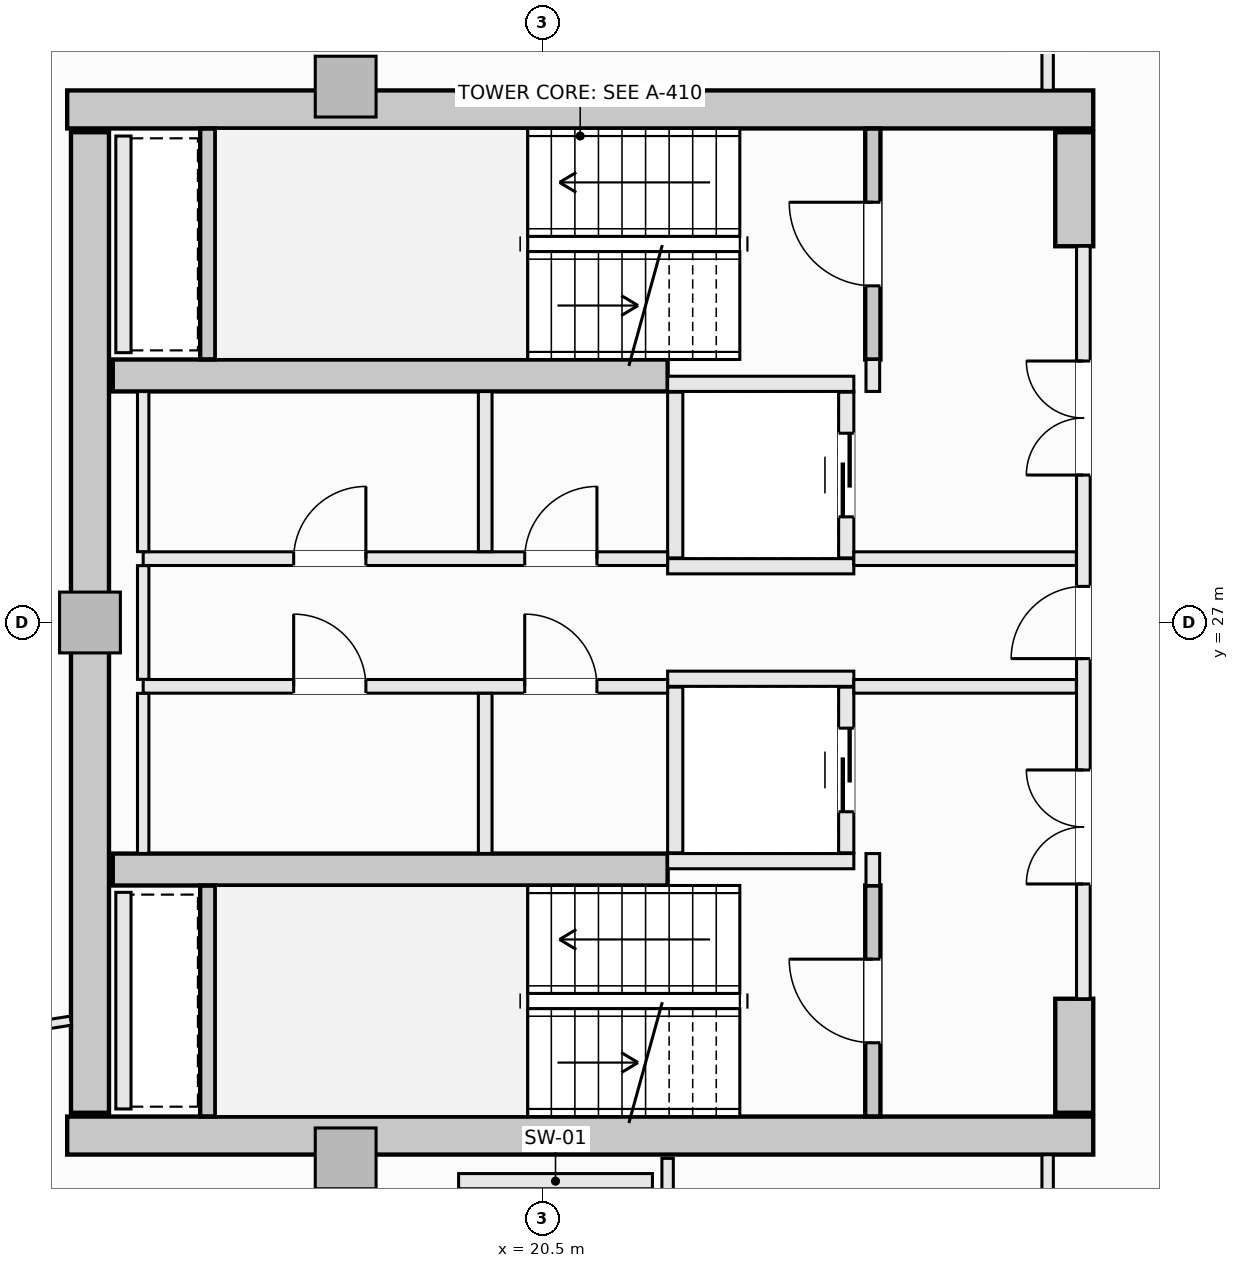
"""IFC4 building model, lengths in metres.
Left out: names, types, materials, properties, quantities, classifications, styles, units other than length and angle.
Written with IfcOpenShell. Run it as: python <this file> out.ifc"""

import sys

from ifc_helpers import new_model, si_unit, direction, frame, frame_2d, origin, origin_2d, place, context, subcontext, project, spatial, rectangle, extrude, element, fill, save


model = new_model("IFC4")
c1 = context("Model", 3, precision=1e-05, world=origin(), true_north=direction((0.0, 1.0)))
c2 = subcontext(c1, "Body", "Model", "MODEL_VIEW")
j1 = project(units=[si_unit("LENGTHUNIT", "METRE"), si_unit("PLANEANGLEUNIT", "RADIAN")], contexts=[c1])
p1 = place(None, origin())
s1 = spatial("IfcSite", under=j1, at=p1, CompositionType="ELEMENT")
p2 = place(p1, origin())
s2 = spatial("IfcBuilding", under=s1, at=p2, CompositionType="ELEMENT")
p3 = place(p2, frame((0.0, 0.0, 219.5)))
s3 = spatial("IfcBuildingStorey", under=s2, at=p3, CompositionType="ELEMENT", Elevation=219.5)
for number, where, z_axis, x_axis in (
    (1, (14.25, 33.75, -0.27), (0.0, 0.0, 1.0), (1.0, 0.0, 0.0)),
    (2, (14.25, 20.25, -0.27), (0.0, 0.0, 1.0), (1.0, 0.0, 0.0)),
):
    element("IfcWall", number, at=place(p3, frame(where, z_axis=z_axis, x_axis=x_axis)), inside=s3, PredefinedType="SHEAR", context=c2, shape_type="SweptSolid", body=[
        extrude(rectangle(XDim=13.5, YDim=0.5, at=frame_2d((6.75, 0.0))), origin(), (0.0, 0.0, 1.0), 3.3),
    ])
p4 = place(p3, frame((14.55, 20.55, -0.27), z_axis=(0.0, 0.0, 1.0), x_axis=(0.0, 1.0, 0.0)))
e3 = element("IfcWall", 3, at=p4, inside=s3, PredefinedType="SHEAR", context=c2, shape_type="SweptSolid", body=[
    extrude(rectangle(XDim=12.9, YDim=0.5, at=frame_2d((6.45, 0.0))), origin(), (0.0, 0.0, 1.0), 3.3),
])
for number, where, z_axis, x_axis in (
    (4, (27.5, 31.95, -0.27), (0.0, 0.0, 1.0), (0.0, 1.0, 0.0)),
    (5, (27.5, 20.55, -0.27), (0.0, 0.0, 1.0), (0.0, 1.0, 0.0)),
):
    element("IfcWall", number, at=place(p3, frame(where, z_axis=z_axis, x_axis=x_axis)), inside=s3, PredefinedType="SHEAR", context=c2, shape_type="SweptSolid", body=[
        extrude(rectangle(XDim=1.5, YDim=0.5, at=frame_2d((0.75, 0.0))), origin(), (0.0, 0.0, 1.0), 3.3),
    ])
for number, where, z_axis, x_axis in (
    (6, (14.85, 30.25, -0.27), (0.0, 0.0, 1.0), (1.0, 0.0, 0.0)),
    (7, (14.85, 23.75, -0.27), (0.0, 0.0, 1.0), (1.0, 0.0, 0.0)),
):
    element("IfcWall", number, at=place(p3, frame(where, z_axis=z_axis, x_axis=x_axis)), inside=s3, PredefinedType="SHEAR", context=c2, shape_type="SweptSolid", body=[
        extrude(rectangle(XDim=7.3, YDim=0.42, at=frame_2d((3.65, 0.0))), origin(), (0.0, 0.0, 1.0), 3.3),
    ])
for number, where, z_axis, x_axis in (
    (8, (17.914, 34.05, -0.27), (0.0, 0.0, 1.0), (1.0, 0.0, 0.0)),
    (9, (14.55, 27.0, -0.27), (0.0, 0.0, 1.0), (1.0, 0.0, 0.0)),
    (10, (17.914, 19.95, -0.27), (0.0, 0.0, 1.0), (1.0, 0.0, 0.0)),
):
    element("IfcColumn", number, at=place(p3, frame(where, z_axis=z_axis, x_axis=x_axis)), inside=s3, PredefinedType="PILASTER", context=c2, shape_type="SweptSolid", body=[
        extrude(rectangle(XDim=0.8, YDim=0.8, at=origin_2d()), origin(), (0.0, 0.0, 1.0), 3.3),
    ])
p5 = place(p3, frame((24.85, 30.46, -0.27), z_axis=(0.0, 0.0, 1.0), x_axis=(0.0, 1.0, 0.0)))
e11 = element("IfcWall", 11, at=p5, inside=s3, PredefinedType="SHEAR", context=c2, shape_type="SweptSolid", body=[
    extrude(rectangle(XDim=3.038, YDim=0.2, at=frame_2d((1.519, 0.0))), origin(), (0.0, 0.0, 1.0), 3.3),
])
p6 = place(p5, frame((0.969, 0.0, 0.27)))
e12 = element("IfcOpeningElement", 12, at=p6, cuts=e11, PredefinedType="OPENING", context=c2, shape_type="SweptSolid", body=[
    extrude(rectangle(XDim=1.1, YDim=2.15, at=frame_2d((0.55, 1.075))), frame((0.0, 0.11, 0.0), z_axis=(0.0, -1.0, 0.0), x_axis=(1.0, 0.0, 0.0)), (0.0, 0.0, 1.0), 0.22),
])
p7 = place(p3, frame((16.1, 30.462, -0.27), z_axis=(0.0, 0.0, 1.0), x_axis=(0.0, 1.0, 0.0)))
e13 = element("IfcWall", 13, at=p7, inside=s3, PredefinedType="SHEAR", context=c2, shape_type="SweptSolid", body=[
    extrude(rectangle(XDim=3.036, YDim=0.2, at=frame_2d((1.518, 0.0))), origin(), (0.0, 0.0, 1.0), 3.3),
])
p8 = place(p3, frame((24.85, 20.502, -0.27), z_axis=(0.0, 0.0, 1.0), x_axis=(0.0, 1.0, 0.0)))
e14 = element("IfcWall", 14, at=p8, inside=s3, PredefinedType="SHEAR", context=c2, shape_type="SweptSolid", body=[
    extrude(rectangle(XDim=3.038, YDim=0.2, at=frame_2d((1.519, 0.0))), origin(), (0.0, 0.0, 1.0), 3.3),
])
p9 = place(p8, frame((0.969, 0.0, 0.27)))
e15 = element("IfcOpeningElement", 15, at=p9, cuts=e14, PredefinedType="OPENING", context=c2, shape_type="SweptSolid", body=[
    extrude(rectangle(XDim=1.1, YDim=2.15, at=frame_2d((0.55, 1.075))), frame((0.0, 0.11, 0.0), z_axis=(0.0, -1.0, 0.0), x_axis=(1.0, 0.0, 0.0)), (0.0, 0.0, 1.0), 0.22),
])
p10 = place(p3, frame((16.1, 20.502, -0.27), z_axis=(0.0, 0.0, 1.0), x_axis=(0.0, 1.0, 0.0)))
e16 = element("IfcWall", 16, at=p10, inside=s3, PredefinedType="SHEAR", context=c2, shape_type="SweptSolid", body=[
    extrude(rectangle(XDim=3.036, YDim=0.2, at=frame_2d((1.518, 0.0))), origin(), (0.0, 0.0, 1.0), 3.3),
])
for number, where, z_axis, x_axis in (
    (17, (22.15, 30.14, 0.0), (0.0, 0.0, 1.0), (1.0, 0.0, 0.0)),
    (18, (22.15, 27.74, 0.0), (0.0, 0.0, 1.0), (1.0, 0.0, 0.0)),
):
    element("IfcWall", number, at=place(p3, frame(where, z_axis=z_axis, x_axis=x_axis)), inside=s3, PredefinedType="SOLIDWALL", context=c2, shape_type="SweptSolid", body=[
        extrude(rectangle(XDim=2.45, YDim=0.2, at=frame_2d((1.225, 0.0))), origin(), (0.0, 0.0, 1.0), 3.03),
    ])
p11 = place(p3, frame((22.25, 27.85, 0.0), z_axis=(0.0, 0.0, 1.0), x_axis=(0.0, 1.0, 0.0)))
e19 = element("IfcWall", 19, at=p11, inside=s3, PredefinedType="SOLIDWALL", context=c2, shape_type="SweptSolid", body=[
    extrude(rectangle(XDim=2.18, YDim=0.2, at=frame_2d((1.09, 0.0))), origin(), (0.0, 0.0, 1.0), 3.03),
])
p12 = place(p3, frame((24.5, 27.85, 0.0), z_axis=(0.0, 0.0, 1.0), x_axis=(0.0, 1.0, 0.0)))
e20 = element("IfcWall", 20, at=p12, inside=s3, PredefinedType="SOLIDWALL", context=c2, shape_type="SweptSolid", body=[
    extrude(rectangle(XDim=2.18, YDim=0.2, at=frame_2d((1.09, 0.0))), origin(), (0.0, 0.0, 1.0), 3.03),
])
p13 = place(p12, frame((0.54, 0.0, 0.0)))
e21 = element("IfcOpeningElement", 21, at=p13, cuts=e20, PredefinedType="OPENING", context=c2, shape_type="SweptSolid", body=[
    extrude(rectangle(XDim=1.1, YDim=2.2, at=frame_2d((0.55, 1.1))), frame((0.0, 0.11, 0.0), z_axis=(0.0, -1.0, 0.0), x_axis=(1.0, 0.0, 0.0)), (0.0, 0.0, 1.0), 0.22),
])
for number, where, z_axis, x_axis in (
    (22, (22.15, 26.26, 0.0), (0.0, 0.0, 1.0), (1.0, 0.0, 0.0)),
    (23, (22.15, 23.86, 0.0), (0.0, 0.0, 1.0), (1.0, 0.0, 0.0)),
):
    element("IfcWall", number, at=place(p3, frame(where, z_axis=z_axis, x_axis=x_axis)), inside=s3, PredefinedType="SOLIDWALL", context=c2, shape_type="SweptSolid", body=[
        extrude(rectangle(XDim=2.45, YDim=0.2, at=frame_2d((1.225, 0.0))), origin(), (0.0, 0.0, 1.0), 3.03),
    ])
p14 = place(p3, frame((22.25, 23.97, 0.0), z_axis=(0.0, 0.0, 1.0), x_axis=(0.0, 1.0, 0.0)))
e24 = element("IfcWall", 24, at=p14, inside=s3, PredefinedType="SOLIDWALL", context=c2, shape_type="SweptSolid", body=[
    extrude(rectangle(XDim=2.18, YDim=0.2, at=frame_2d((1.09, 0.0))), origin(), (0.0, 0.0, 1.0), 3.03),
])
p15 = place(p3, frame((24.5, 23.97, 0.0), z_axis=(0.0, 0.0, 1.0), x_axis=(0.0, 1.0, 0.0)))
e25 = element("IfcWall", 25, at=p15, inside=s3, PredefinedType="SOLIDWALL", context=c2, shape_type="SweptSolid", body=[
    extrude(rectangle(XDim=2.18, YDim=0.2, at=frame_2d((1.09, 0.0))), origin(), (0.0, 0.0, 1.0), 3.03),
])
p16 = place(p15, frame((0.54, 0.0, 0.0)))
e26 = element("IfcOpeningElement", 26, at=p16, cuts=e25, PredefinedType="OPENING", context=c2, shape_type="SweptSolid", body=[
    extrude(rectangle(XDim=1.1, YDim=2.2, at=frame_2d((0.55, 1.1))), frame((0.0, 0.11, 0.0), z_axis=(0.0, -1.0, 0.0), x_axis=(1.0, 0.0, 0.0)), (0.0, 0.0, 1.0), 0.22),
])
p17 = place(p3, frame((19.4, 19.65, 0.0), z_axis=(0.0, 0.0, 1.0), x_axis=(1.0, 0.0, 0.0)))
e27 = element("IfcWall", 27, at=p17, inside=s3, PredefinedType="SOLIDWALL", context=c2, shape_type="SweptSolid", body=[
    extrude(rectangle(XDim=2.55, YDim=0.2, at=frame_2d((1.275, 0.0))), origin(), (0.0, 0.0, 1.0), 3.03),
])
for number, where, z_axis, x_axis in (
    (28, (14.99, 30.55, 0.0), (0.0, 0.0, 1.0), (0.0, 1.0, 0.0)),
    (29, (14.99, 20.6, 0.0), (0.0, 0.0, 1.0), (0.0, 1.0, 0.0)),
):
    element("IfcWall", number, at=place(p3, frame(where, z_axis=z_axis, x_axis=x_axis)), inside=s3, PredefinedType="SOLIDWALL", context=c2, shape_type="SweptSolid", body=[
        extrude(rectangle(XDim=2.85, YDim=0.2, at=frame_2d((1.425, 0.0))), origin(), (0.0, 0.0, 1.0), 3.03),
    ])
for number, where, z_axis, x_axis in (
    (30, (24.85, 23.54, 0.0), (0.0, 0.0, 1.0), (0.0, 1.0, 0.0)),
    (31, (24.85, 30.04, 0.0), (0.0, 0.0, 1.0), (0.0, 1.0, 0.0)),
):
    element("IfcWall", number, at=place(p3, frame(where, z_axis=z_axis, x_axis=x_axis)), inside=s3, PredefinedType="SOLIDWALL", context=c2, shape_type="SweptSolid", body=[
        extrude(rectangle(XDim=0.42, YDim=0.18, at=frame_2d((0.21, 0.0))), origin(), (0.0, 0.0, 1.0), 3.03),
    ])
p18 = place(p3, frame((27.62, 22.05, 0.0), z_axis=(0.0, 0.0, 1.0), x_axis=(0.0, 1.0, 0.0)))
e32 = element("IfcWall", 32, at=p18, inside=s3, PredefinedType="SOLIDWALL", context=c2, shape_type="SweptSolid", body=[
    extrude(rectangle(XDim=9.9, YDim=0.18, at=frame_2d((4.95, 0.0))), origin(), (0.0, 0.0, 1.0), 3.03),
])
p19 = place(p18, frame((4.475, 0.0, 0.0)))
e33 = element("IfcOpeningElement", 33, at=p19, cuts=e32, PredefinedType="OPENING", context=c2, shape_type="SweptSolid", body=[
    extrude(rectangle(XDim=0.95, YDim=2.1, at=frame_2d((0.475, 1.05))), frame((0.0, 0.1, 0.0), z_axis=(0.0, -1.0, 0.0), x_axis=(1.0, 0.0, 0.0)), (0.0, 0.0, 1.0), 0.2),
])
p20 = place(p18, frame((6.89, 0.0, 0.0)))
e34 = element("IfcOpeningElement", 34, at=p20, cuts=e32, PredefinedType="OPENING", context=c2, shape_type="SweptSolid", body=[
    extrude(rectangle(XDim=1.5, YDim=2.2, at=frame_2d((0.75, 1.1))), frame((0.0, 0.1, 0.0), z_axis=(0.0, -1.0, 0.0), x_axis=(1.0, 0.0, 0.0)), (0.0, 0.0, 1.0), 0.2),
])
p21 = place(p18, frame((1.51, 0.0, 0.0)))
e35 = element("IfcOpeningElement", 35, at=p21, cuts=e32, PredefinedType="OPENING", context=c2, shape_type="SweptSolid", body=[
    extrude(rectangle(XDim=1.5, YDim=2.2, at=frame_2d((0.75, 1.1))), frame((0.0, 0.1, 0.0), z_axis=(0.0, -1.0, 0.0), x_axis=(1.0, 0.0, 0.0)), (0.0, 0.0, 1.0), 0.2),
])
p22 = place(p3, frame((15.25, 27.84, 0.0), z_axis=(0.0, 0.0, 1.0), x_axis=(1.0, 0.0, 0.0)))
e36 = element("IfcWall", 36, at=p22, inside=s3, PredefinedType="SOLIDWALL", context=c2, shape_type="SweptSolid", body=[
    extrude(rectangle(XDim=6.9, YDim=0.18, at=frame_2d((3.45, 0.0))), origin(), (0.0, 0.0, 1.0), 3.03),
])
p23 = place(p22, frame((5.02, 0.0, 0.0)))
e37 = element("IfcOpeningElement", 37, at=p23, cuts=e36, PredefinedType="OPENING", context=c2, shape_type="SweptSolid", body=[
    extrude(rectangle(XDim=0.95, YDim=2.1, at=frame_2d((0.475, 1.05))), frame((0.0, 0.1, 0.0), z_axis=(0.0, -1.0, 0.0), x_axis=(1.0, 0.0, 0.0)), (0.0, 0.0, 1.0), 0.2),
])
p24 = place(p22, frame((1.98, 0.0, 0.0)))
e38 = element("IfcOpeningElement", 38, at=p24, cuts=e36, PredefinedType="OPENING", context=c2, shape_type="SweptSolid", body=[
    extrude(rectangle(XDim=0.95, YDim=2.1, at=frame_2d((0.475, 1.05))), frame((0.0, 0.1, 0.0), z_axis=(0.0, -1.0, 0.0), x_axis=(1.0, 0.0, 0.0)), (0.0, 0.0, 1.0), 0.2),
])
p25 = place(p3, frame((24.6, 27.84, 0.0), z_axis=(0.0, 0.0, 1.0), x_axis=(1.0, 0.0, 0.0)))
e39 = element("IfcWall", 39, at=p25, inside=s3, PredefinedType="SOLIDWALL", context=c2, shape_type="SweptSolid", body=[
    extrude(rectangle(XDim=2.928, YDim=0.18, at=frame_2d((1.464, 0.0))), origin(), (0.0, 0.0, 1.0), 3.03),
])
p26 = place(p3, frame((15.25, 26.16, 0.0), z_axis=(0.0, 0.0, 1.0), x_axis=(1.0, 0.0, 0.0)))
e40 = element("IfcWall", 40, at=p26, inside=s3, PredefinedType="SOLIDWALL", context=c2, shape_type="SweptSolid", body=[
    extrude(rectangle(XDim=6.9, YDim=0.18, at=frame_2d((3.45, 0.0))), origin(), (0.0, 0.0, 1.0), 3.03),
])
p27 = place(p26, frame((5.02, 0.0, 0.0)))
e41 = element("IfcOpeningElement", 41, at=p27, cuts=e40, PredefinedType="OPENING", context=c2, shape_type="SweptSolid", body=[
    extrude(rectangle(XDim=0.95, YDim=2.1, at=frame_2d((0.475, 1.05))), frame((0.0, 0.1, 0.0), z_axis=(0.0, -1.0, 0.0), x_axis=(1.0, 0.0, 0.0)), (0.0, 0.0, 1.0), 0.2),
])
p28 = place(p26, frame((1.98, 0.0, 0.0)))
e42 = element("IfcOpeningElement", 42, at=p28, cuts=e40, PredefinedType="OPENING", context=c2, shape_type="SweptSolid", body=[
    extrude(rectangle(XDim=0.95, YDim=2.1, at=frame_2d((0.475, 1.05))), frame((0.0, 0.1, 0.0), z_axis=(0.0, -1.0, 0.0), x_axis=(1.0, 0.0, 0.0)), (0.0, 0.0, 1.0), 0.2),
])
p29 = place(p3, frame((24.6, 26.16, 0.0), z_axis=(0.0, 0.0, 1.0), x_axis=(1.0, 0.0, 0.0)))
e43 = element("IfcWall", 43, at=p29, inside=s3, PredefinedType="SOLIDWALL", context=c2, shape_type="SweptSolid", body=[
    extrude(rectangle(XDim=2.928, YDim=0.18, at=frame_2d((1.464, 0.0))), origin(), (0.0, 0.0, 1.0), 3.03),
])
p30 = place(p3, frame((15.25, 23.962, 0.0), z_axis=(0.0, 0.0, 1.0), x_axis=(0.0, 1.0, 0.0)))
e44 = element("IfcWall", 44, at=p30, inside=s3, PredefinedType="PARTITIONING", context=c2, shape_type="SweptSolid", body=[
    extrude(rectangle(XDim=2.106, YDim=0.15, at=frame_2d((1.053, 0.0))), origin(), (0.0, 0.0, 1.0), 3.03),
])
p31 = place(p3, frame((15.25, 26.252, 0.0), z_axis=(0.0, 0.0, 1.0), x_axis=(0.0, 1.0, 0.0)))
e45 = element("IfcWall", 45, at=p31, inside=s3, PredefinedType="PARTITIONING", context=c2, shape_type="SweptSolid", body=[
    extrude(rectangle(XDim=1.496, YDim=0.15, at=frame_2d((0.748, 0.0))), origin(), (0.0, 0.0, 1.0), 3.03),
])
p32 = place(p3, frame((15.25, 27.932, 0.0), z_axis=(0.0, 0.0, 1.0), x_axis=(0.0, 1.0, 0.0)))
e46 = element("IfcWall", 46, at=p32, inside=s3, PredefinedType="PARTITIONING", context=c2, shape_type="SweptSolid", body=[
    extrude(rectangle(XDim=2.106, YDim=0.15, at=frame_2d((1.053, 0.0))), origin(), (0.0, 0.0, 1.0), 3.03),
])
for number, where, z_axis, x_axis in (
    (47, (19.75, 23.962, 0.0), (0.0, 0.0, 1.0), (0.0, 1.0, 0.0)),
    (48, (19.75, 27.932, 0.0), (0.0, 0.0, 1.0), (0.0, 1.0, 0.0)),
):
    element("IfcWall", number, at=place(p3, frame(where, z_axis=z_axis, x_axis=x_axis)), inside=s3, PredefinedType="SOLIDWALL", context=c2, shape_type="SweptSolid", body=[
        extrude(rectangle(XDim=2.106, YDim=0.18, at=frame_2d((1.053, 0.0))), origin(), (0.0, 0.0, 1.0), 3.03),
    ])
p33 = place(p3, frame((22.15, 17.127, 0.0), z_axis=(0.0, 0.0, 1.0), x_axis=(0.0, 1.0, 0.0)))
e49 = element("IfcWall", 49, at=p33, inside=s3, PredefinedType="PARTITIONING", context=c2, shape_type="SweptSolid", body=[
    extrude(rectangle(XDim=2.823, YDim=0.15, at=frame_2d((1.412, 0.0))), origin(), (0.0, 0.0, 1.0), 3.03),
])
p34 = place(p3, frame((27.15, 17.127, 0.0), z_axis=(0.0, 0.0, 1.0), x_axis=(0.0, 1.0, 0.0)))
e50 = element("IfcWall", 50, at=p34, inside=s3, PredefinedType="PARTITIONING", context=c2, shape_type="SweptSolid", body=[
    extrude(rectangle(XDim=2.871, YDim=0.15, at=frame_2d((1.436, 0.0))), origin(), (0.0, 0.0, 1.0), 3.03),
])
p35 = place(p34, frame((0.96, 0.0, 0.0)))
e51 = element("IfcOpeningElement", 51, at=p35, cuts=e50, PredefinedType="OPENING", context=c2, shape_type="SweptSolid", body=[
    extrude(rectangle(XDim=0.95, YDim=2.1, at=frame_2d((0.475, 1.05))), frame((0.0, 0.085, 0.0), z_axis=(0.0, -1.0, 0.0), x_axis=(1.0, 0.0, 0.0)), (0.0, 0.0, 1.0), 0.17),
])
p36 = place(p3, frame((27.15, 34.002, 0.0), z_axis=(0.0, 0.0, 1.0), x_axis=(0.0, 1.0, 0.0)))
e52 = element("IfcWall", 52, at=p36, inside=s3, PredefinedType="PARTITIONING", context=c2, shape_type="SweptSolid", body=[
    extrude(rectangle(XDim=4.198, YDim=0.15, at=frame_2d((2.099, 0.0))), origin(), (0.0, 0.0, 1.0), 3.03),
])
p37 = place(p36, frame((1.998, 0.0, 0.0)))
e53 = element("IfcOpeningElement", 53, at=p37, cuts=e52, PredefinedType="OPENING", context=c2, shape_type="SweptSolid", body=[
    extrude(rectangle(XDim=0.95, YDim=2.1, at=frame_2d((0.475, 1.05))), frame((0.0, 0.085, 0.0), z_axis=(0.0, -1.0, 0.0), x_axis=(1.0, 0.0, 0.0)), (0.0, 0.0, 1.0), 0.17),
])
p38 = place(p3, frame((7.041, 20.617, 0.0), z_axis=(0.0, 0.0, 1.0), x_axis=(0.987780472541, 0.155851654036, 0.0)))
e54 = element("IfcWall", 54, at=p38, inside=s3, PredefinedType="PARTITIONING", context=c2, shape_type="SweptSolid", body=[
    extrude(rectangle(XDim=7.347, YDim=0.12, at=frame_2d((3.673, 0.0))), origin(), (0.0, 0.0, 1.0), 3.03),
])
p39 = place(p6, origin())
e55 = element("IfcDoor", 55, at=p39, inside=s3, OperationType="SINGLE_SWING_RIGHT", PredefinedType="DOOR", context=c2, shape_type="SweptSolid", body=[
    extrude(rectangle(XDim=1.1, YDim=2.15, at=frame_2d((0.55, 1.075))), frame((0.0, 0.025, 0.0), z_axis=(0.0, -1.0, 0.0), x_axis=(1.0, 0.0, 0.0)), (0.0, 0.0, 1.0), 0.05),
])
fill(e12, e55)
p40 = place(p9, origin())
e56 = element("IfcDoor", 56, at=p40, inside=s3, OperationType="SINGLE_SWING_RIGHT", PredefinedType="DOOR", context=c2, shape_type="SweptSolid", body=[
    extrude(rectangle(XDim=1.1, YDim=2.15, at=frame_2d((0.55, 1.075))), frame((0.0, 0.025, 0.0), z_axis=(0.0, -1.0, 0.0), x_axis=(1.0, 0.0, 0.0)), (0.0, 0.0, 1.0), 0.05),
])
fill(e15, e56)
p41 = place(p13, origin())
e57 = element("IfcDoor", 57, at=p41, inside=s3, OperationType="SLIDING_TO_LEFT", PredefinedType="DOOR", context=c2, shape_type="SweptSolid", body=[
    extrude(rectangle(XDim=1.1, YDim=2.2, at=frame_2d((0.55, 1.1))), frame((0.0, 0.025, 0.0), z_axis=(0.0, -1.0, 0.0), x_axis=(1.0, 0.0, 0.0)), (0.0, 0.0, 1.0), 0.05),
])
fill(e21, e57)
p42 = place(p16, origin())
e58 = element("IfcDoor", 58, at=p42, inside=s3, OperationType="SLIDING_TO_LEFT", PredefinedType="DOOR", context=c2, shape_type="SweptSolid", body=[
    extrude(rectangle(XDim=1.1, YDim=2.2, at=frame_2d((0.55, 1.1))), frame((0.0, 0.025, 0.0), z_axis=(0.0, -1.0, 0.0), x_axis=(1.0, 0.0, 0.0)), (0.0, 0.0, 1.0), 0.05),
])
fill(e26, e58)
p43 = place(p19, origin())
e59 = element("IfcDoor", 59, at=p43, inside=s3, OperationType="SINGLE_SWING_LEFT", PredefinedType="DOOR", context=c2, shape_type="SweptSolid", body=[
    extrude(rectangle(XDim=0.95, YDim=2.1, at=frame_2d((0.475, 1.05))), frame((0.0, 0.025, 0.0), z_axis=(0.0, -1.0, 0.0), x_axis=(1.0, 0.0, 0.0)), (0.0, 0.0, 1.0), 0.05),
])
fill(e33, e59)
p44 = place(p20, origin())
e60 = element("IfcDoor", 60, at=p44, inside=s3, OperationType="DOUBLE_DOOR_SINGLE_SWING", PredefinedType="DOOR", context=c2, shape_type="SweptSolid", body=[
    extrude(rectangle(XDim=1.5, YDim=2.2, at=frame_2d((0.75, 1.1))), frame((0.0, 0.025, 0.0), z_axis=(0.0, -1.0, 0.0), x_axis=(1.0, 0.0, 0.0)), (0.0, 0.0, 1.0), 0.05),
])
fill(e34, e60)
p45 = place(p21, origin())
e61 = element("IfcDoor", 61, at=p45, inside=s3, OperationType="DOUBLE_DOOR_SINGLE_SWING", PredefinedType="DOOR", context=c2, shape_type="SweptSolid", body=[
    extrude(rectangle(XDim=1.5, YDim=2.2, at=frame_2d((0.75, 1.1))), frame((0.0, 0.025, 0.0), z_axis=(0.0, -1.0, 0.0), x_axis=(1.0, 0.0, 0.0)), (0.0, 0.0, 1.0), 0.05),
])
fill(e35, e61)
p46 = place(p23, origin())
e62 = element("IfcDoor", 62, at=p46, inside=s3, OperationType="SINGLE_SWING_RIGHT", PredefinedType="DOOR", context=c2, shape_type="SweptSolid", body=[
    extrude(rectangle(XDim=0.95, YDim=2.1, at=frame_2d((0.475, 1.05))), frame((0.0, 0.025, 0.0), z_axis=(0.0, -1.0, 0.0), x_axis=(1.0, 0.0, 0.0)), (0.0, 0.0, 1.0), 0.05),
])
fill(e37, e62)
p47 = place(p27, origin())
e63 = element("IfcDoor", 63, at=p47, inside=s3, OperationType="SINGLE_SWING_LEFT", PredefinedType="DOOR", context=c2, shape_type="SweptSolid", body=[
    extrude(rectangle(XDim=0.95, YDim=2.1, at=frame_2d((0.475, 1.05))), frame((0.0, 0.025, 0.0), z_axis=(0.0, -1.0, 0.0), x_axis=(1.0, 0.0, 0.0)), (0.0, 0.0, 1.0), 0.05),
])
fill(e41, e63)
p48 = place(p24, origin())
e64 = element("IfcDoor", 64, at=p48, inside=s3, OperationType="SINGLE_SWING_RIGHT", PredefinedType="DOOR", context=c2, shape_type="SweptSolid", body=[
    extrude(rectangle(XDim=0.95, YDim=2.1, at=frame_2d((0.475, 1.05))), frame((0.0, 0.025, 0.0), z_axis=(0.0, -1.0, 0.0), x_axis=(1.0, 0.0, 0.0)), (0.0, 0.0, 1.0), 0.05),
])
fill(e38, e64)
p49 = place(p28, origin())
e65 = element("IfcDoor", 65, at=p49, inside=s3, OperationType="SINGLE_SWING_LEFT", PredefinedType="DOOR", context=c2, shape_type="SweptSolid", body=[
    extrude(rectangle(XDim=0.95, YDim=2.1, at=frame_2d((0.475, 1.05))), frame((0.0, 0.025, 0.0), z_axis=(0.0, -1.0, 0.0), x_axis=(1.0, 0.0, 0.0)), (0.0, 0.0, 1.0), 0.05),
])
fill(e42, e65)
save(model, sys.argv[1])
